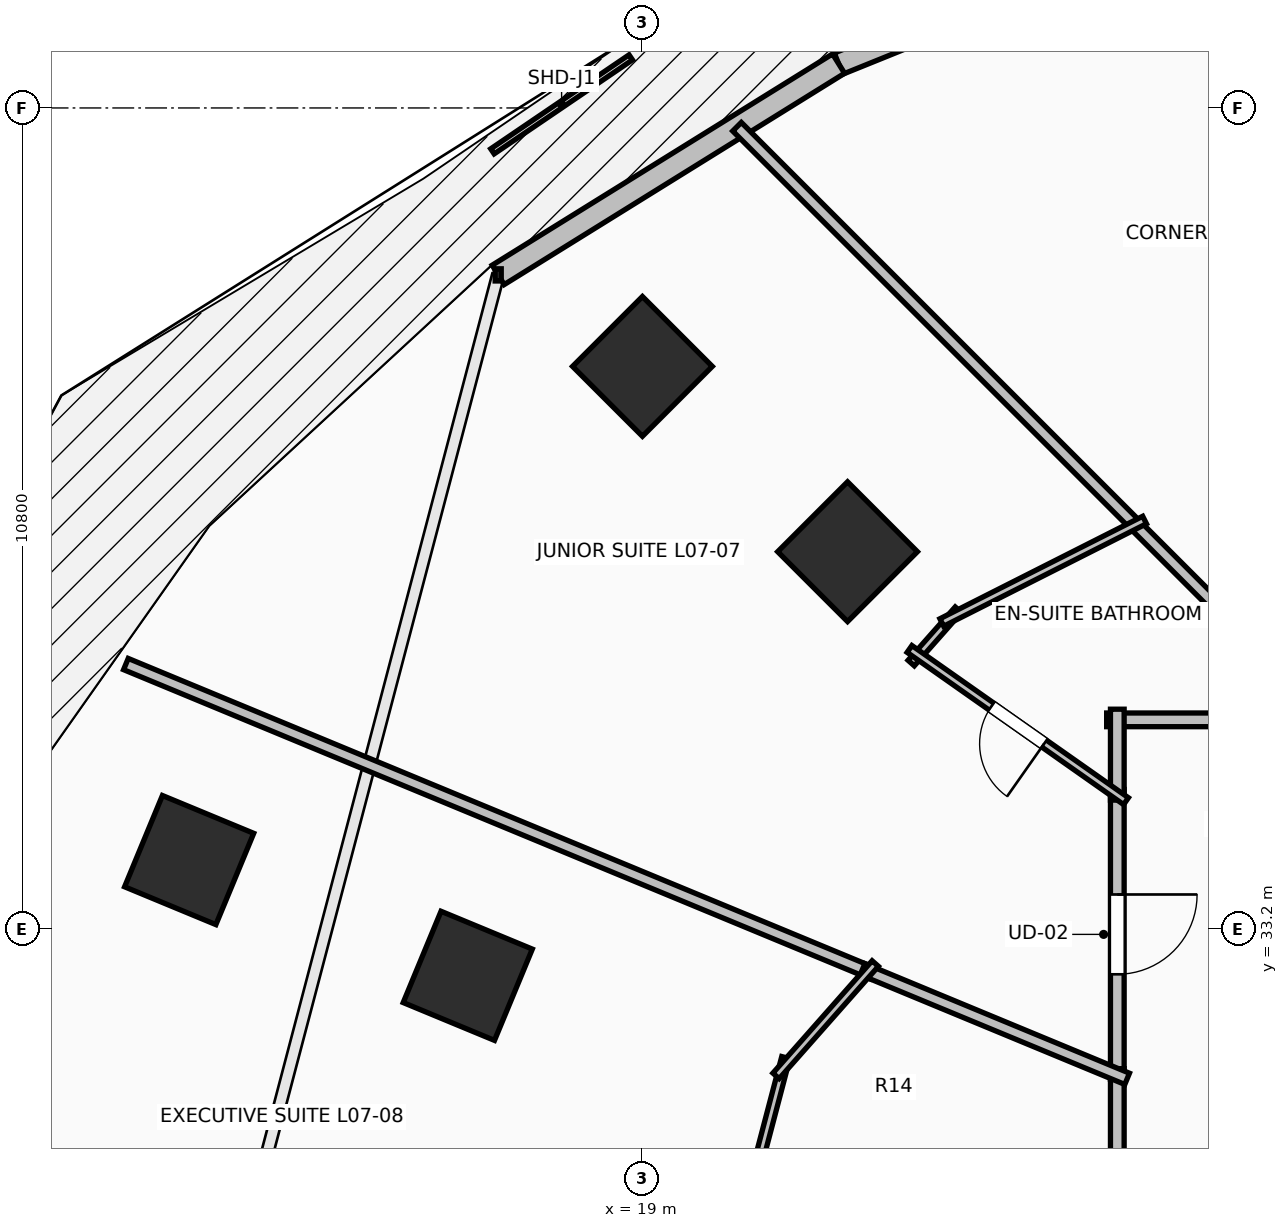
"""IFC4 building model, lengths in metres.
Left out: names, types, materials, properties, quantities, classifications, styles, units other than length and angle.
Written with IfcOpenShell. Run it as: python <this file> out.ifc"""

import sys

from ifc_helpers import new_model, si_unit, direction, frame, frame_2d, origin, origin_2d, place, context, subcontext, project, spatial, rectangle, extrude, element, fill, save


model = new_model("IFC4")
c1 = context("Model", 3, precision=1e-05, world=origin(), true_north=direction((0.0, 1.0)))
c2 = subcontext(c1, "Body", "Model", "MODEL_VIEW")
j1 = project(units=[si_unit("LENGTHUNIT", "METRE"), si_unit("PLANEANGLEUNIT", "RADIAN")], contexts=[c1])
p1 = place(None, origin())
s1 = spatial("IfcSite", under=j1, at=p1, CompositionType="ELEMENT")
p2 = place(p1, origin())
s2 = spatial("IfcBuilding", under=s1, at=p2, CompositionType="ELEMENT")
p3 = place(p2, frame((0.0, 0.0, 31.0)))
s3 = spatial("IfcBuildingStorey", under=s2, at=p3, CompositionType="ELEMENT", Elevation=31.0)
for number, where, z_axis, x_axis in (
    (1, (21.701, 38.162, 0.0), (0.0, 0.0, 1.0), (-0.707, 0.707, 0.0)),
    (2, (16.705, 32.582, 0.0), (0.0, 0.0, 1.0), (-0.924, 0.383, 0.0)),
    (3, (19.003, 40.6, 0.0), (0.0, 0.0, 1.0), (-0.707, 0.707, 0.0)),
    (4, (13.039, 34.105, 0.0), (0.0, 0.0, 1.0), (-0.924, 0.383, 0.0)),
):
    element("IfcColumn", number, at=place(p3, frame(where, z_axis=z_axis, x_axis=x_axis)), inside=s3, PredefinedType="COLUMN", context=c2, shape_type="SweptSolid", body=[
        extrude(rectangle(XDim=1.3, YDim=1.3, at=origin_2d()), origin(), (0.0, 0.0, 1.0), 3.5),
    ])
p4 = place(p3, frame((26.692, 46.649, 0.0), z_axis=(0.0, 0.0, 1.0), x_axis=(-0.927095325176, -0.374825636845, 0.0)))
e5 = element("IfcWall", 5, at=p4, inside=s3, PredefinedType="STANDARD", context=c2, shape_type="SweptSolid", body=[
    extrude(rectangle(XDim=5.51, YDim=0.3, at=frame_2d((2.755, 0.0))), origin(), (0.0, 0.0, 1.0), 3.24),
])
p5 = place(p4, frame((1.955, 0.0, 0.0)))
e6 = element("IfcOpeningElement", 6, at=p5, cuts=e5, PredefinedType="OPENING", context=c2, shape_type="SweptSolid", body=[
    extrude(rectangle(XDim=1.6, YDim=2.3, at=frame_2d((0.8, 1.15))), frame((0.0, 0.165, 0.0), z_axis=(0.0, -1.0, 0.0), x_axis=(1.0, 0.0, 0.0)), (0.0, 0.0, 1.0), 0.33),
])
p6 = place(p3, frame((21.583, 44.583, 0.0), z_axis=(0.0, 0.0, 1.0), x_axis=(-0.849633724826, -0.527373239404, 0.0)))
e7 = element("IfcWall", 7, at=p6, inside=s3, PredefinedType="STANDARD", context=c2, shape_type="SweptSolid", body=[
    extrude(rectangle(XDim=5.271, YDim=0.3, at=frame_2d((2.635, 0.0))), origin(), (0.0, 0.0, 1.0), 3.24),
])
p7 = place(p3, frame((25.25, 35.034, 0.0), z_axis=(0.0, 0.0, 1.0), x_axis=(0.0, -1.0, 0.0)))
e8 = element("IfcWall", 8, at=p7, inside=s3, PredefinedType="PARTITIONING", context=c2, shape_type="SweptSolid", body=[
    extrude(rectangle(XDim=3.813, YDim=0.18, at=frame_2d((1.906, 0.0))), origin(), (0.0, 0.0, 1.0), 2.432),
])
p8 = place(p7, frame((1.382, 0.0, 0.0)))
e9 = element("IfcOpeningElement", 9, at=p8, cuts=e8, PredefinedType="OPENING", context=c2, shape_type="SweptSolid", body=[
    extrude(rectangle(XDim=1.05, YDim=2.2, at=frame_2d((0.525, 1.1))), frame((0.0, 0.105, 0.0), z_axis=(0.0, -1.0, 0.0), x_axis=(1.0, 0.0, 0.0)), (0.0, 0.0, 1.0), 0.21),
])
p9 = place(p3, frame((28.105, 35.95, 0.0), z_axis=(0.0, 0.0, 1.0), x_axis=(-1.0, 0.0, 0.0)))
e10 = element("IfcWall", 10, at=p9, inside=s3, PredefinedType="PARTITIONING", context=c2, shape_type="SweptSolid", body=[
    extrude(rectangle(XDim=2.995, YDim=0.18, at=frame_2d((1.498, 0.0))), origin(), (0.0, 0.0, 1.0), 2.432),
])
p10 = place(p3, frame((25.25, 36.09, 0.0), z_axis=(0.0, 0.0, 1.0), x_axis=(0.0, -1.0, 0.0)))
e11 = element("IfcWall", 11, at=p10, inside=s3, PredefinedType="PARTITIONING", context=c2, shape_type="SweptSolid", body=[
    extrude(rectangle(XDim=1.196, YDim=0.18, at=frame_2d((0.598, 0.0))), origin(), (0.0, 0.0, 1.0), 2.432),
])
p11 = place(p3, frame((25.25, 31.361, 0.0), z_axis=(0.0, 0.0, 1.0), x_axis=(0.0, -1.0, 0.0)))
e12 = element("IfcWall", 12, at=p11, inside=s3, PredefinedType="PARTITIONING", context=c2, shape_type="SweptSolid", body=[
    extrude(rectangle(XDim=2.59, YDim=0.18, at=frame_2d((1.295, 0.0))), origin(), (0.0, 0.0, 1.0), 2.432),
])
p12 = place(p3, frame((20.247, 43.753, 0.0), z_axis=(0.0, 0.0, 1.0), x_axis=(0.707106781187, -0.707106781187, 0.0)))
e13 = element("IfcWall", 13, at=p12, inside=s3, PredefinedType="PARTITIONING", context=c2, shape_type="SweptSolid", body=[
    extrude(rectangle(XDim=11.035, YDim=0.16, at=frame_2d((5.518, 0.0))), origin(), (0.0, 0.0, 1.0), 2.432),
])
p13 = place(p3, frame((22.538, 36.697, 0.0), z_axis=(0.0, 0.0, 1.0), x_axis=(0.662242037053, 0.749289986827, 0.0)))
e14 = element("IfcWall", 14, at=p13, inside=s3, PredefinedType="PARTITIONING", context=c2, shape_type="SweptSolid", body=[
    extrude(rectangle(XDim=0.937, YDim=0.11, at=frame_2d((0.468, 0.0))), origin(), (0.0, 0.0, 1.0), 2.432),
])
p14 = place(p3, frame((22.941, 37.231, 0.0), z_axis=(0.0, 0.0, 1.0), x_axis=(0.892507731149, 0.451032094024, 0.0)))
e15 = element("IfcWall", 15, at=p14, inside=s3, PredefinedType="PARTITIONING", context=c2, shape_type="SweptSolid", body=[
    extrude(rectangle(XDim=2.989, YDim=0.11, at=frame_2d((1.495, 0.0))), origin(), (0.0, 0.0, 1.0), 2.432),
])
p15 = place(p3, frame((25.365, 34.881, 0.0), z_axis=(0.0, 0.0, 1.0), x_axis=(-0.81809360258, 0.575085087111, 0.0)))
e16 = element("IfcWall", 16, at=p15, inside=s3, PredefinedType="PARTITIONING", context=c2, shape_type="SweptSolid", body=[
    extrude(rectangle(XDim=3.481, YDim=0.11, at=frame_2d((1.741, 0.0))), origin(), (0.0, 0.0, 1.0), 2.432),
])
p16 = place(p15, frame((1.316, 0.0, 0.0)))
e17 = element("IfcOpeningElement", 17, at=p16, cuts=e16, PredefinedType="OPENING", context=c2, shape_type="SweptSolid", body=[
    extrude(rectangle(XDim=0.85, YDim=2.1, at=frame_2d((0.425, 1.05))), frame((0.0, 0.07, 0.0), z_axis=(0.0, -1.0, 0.0), x_axis=(1.0, 0.0, 0.0)), (0.0, 0.0, 1.0), 0.14),
])
p17 = place(p3, frame((12.207, 36.684, 0.0), z_axis=(0.0, 0.0, 1.0), x_axis=(0.923876032578, -0.382691881842, 0.0)))
e18 = element("IfcWall", 18, at=p17, inside=s3, PredefinedType="PARTITIONING", context=c2, shape_type="SweptSolid", body=[
    extrude(rectangle(XDim=10.63, YDim=0.16, at=frame_2d((5.315, 0.0))), origin(), (0.0, 0.0, 1.0), 2.624),
])
p18 = place(p3, frame((21.899, 32.669, 0.0), z_axis=(0.0, 0.0, 1.0), x_axis=(0.923843852071, -0.382769561211, 0.0)))
e19 = element("IfcWall", 19, at=p18, inside=s3, PredefinedType="PARTITIONING", context=c2, shape_type="SweptSolid", body=[
    extrude(rectangle(XDim=3.768, YDim=0.16, at=frame_2d((1.884, 0.0))), origin(), (0.0, 0.0, 1.0), 2.922),
])
p19 = place(p3, frame((20.435, 29.783, 0.0), z_axis=(0.0, 0.0, 1.0), x_axis=(0.254378671262, 0.967104695267, 0.0)))
e20 = element("IfcWall", 20, at=p19, inside=s3, PredefinedType="PARTITIONING", context=c2, shape_type="SweptSolid", body=[
    extrude(rectangle(XDim=1.782, YDim=0.11, at=frame_2d((0.891, 0.0))), origin(), (0.0, 0.0, 1.0), 2.432),
])
p20 = place(p3, frame((20.76, 31.266, 0.0), z_axis=(0.0, 0.0, 1.0), x_axis=(0.662047420969, 0.749461948593, 0.0)))
e21 = element("IfcWall", 21, at=p20, inside=s3, PredefinedType="PARTITIONING", context=c2, shape_type="SweptSolid", body=[
    extrude(rectangle(XDim=1.972, YDim=0.11, at=frame_2d((0.986, 0.0))), origin(), (0.0, 0.0, 1.0), 3.24),
])
p21 = place(p8, origin())
e22 = element("IfcDoor", 22, at=p21, inside=s3, OperationType="SINGLE_SWING_LEFT", PredefinedType="DOOR", context=c2, shape_type="SweptSolid", body=[
    extrude(rectangle(XDim=1.05, YDim=2.2, at=frame_2d((0.525, 1.1))), frame((0.0, 0.025, 0.0), z_axis=(0.0, -1.0, 0.0), x_axis=(1.0, 0.0, 0.0)), (0.0, 0.0, 1.0), 0.05),
])
fill(e9, e22)
p22 = place(p16, origin())
e23 = element("IfcDoor", 23, at=p22, inside=s3, OperationType="SINGLE_SWING_LEFT", PredefinedType="DOOR", context=c2, shape_type="SweptSolid", body=[
    extrude(rectangle(XDim=0.85, YDim=2.1, at=frame_2d((0.425, 1.05))), frame((0.0, 0.025, 0.0), z_axis=(0.0, -1.0, 0.0), x_axis=(1.0, 0.0, 0.0)), (0.0, 0.0, 1.0), 0.05),
])
fill(e17, e23)
save(model, sys.argv[1])
